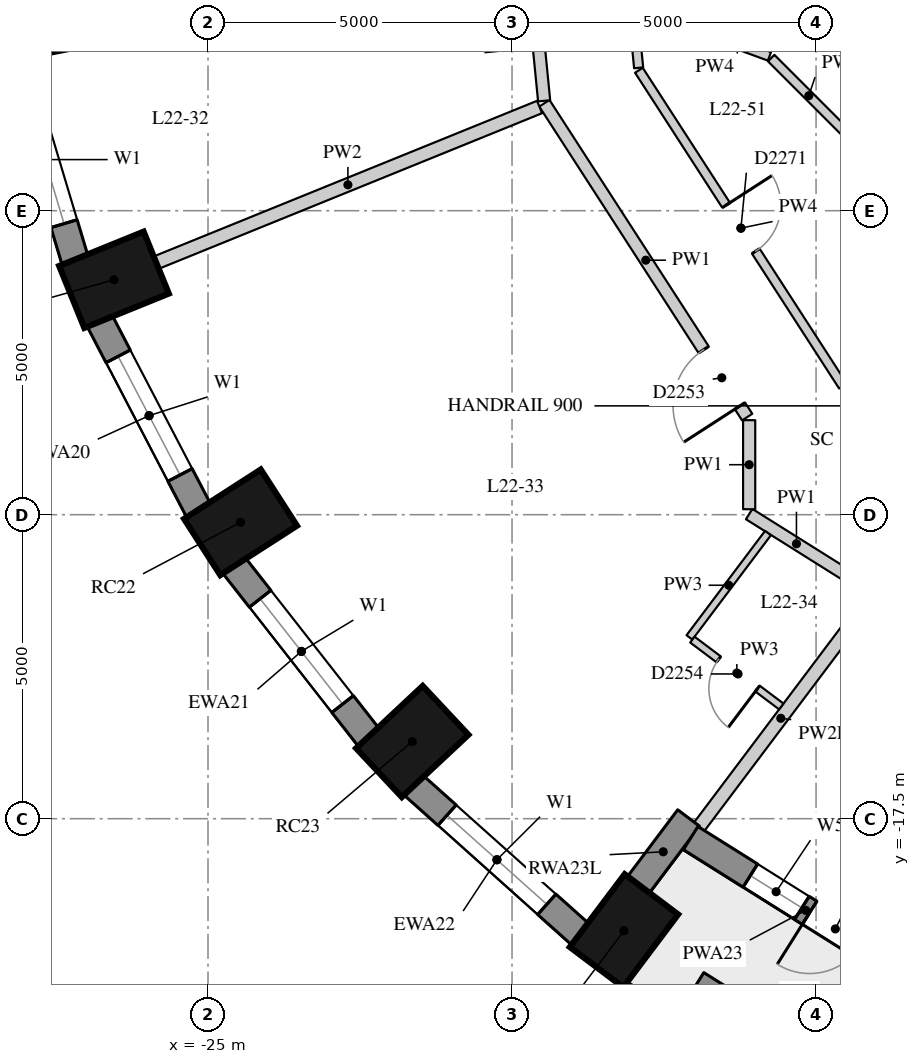
"""IFC4 building model, lengths in metres.
Left out: names, types, materials, properties, quantities, classifications, styles, units other than length and angle.
Written with IfcOpenShell. Run it as: python <this file> out.ifc"""

import sys

from ifc_helpers import new_model, si_unit, direction, frame, frame_2d, origin, origin_2d, place, context, subcontext, project, spatial, rectangle, extrude, element, fill, save


model = new_model("IFC4")
c1 = context("Model", 3, precision=1e-05, world=origin(), true_north=direction((0.0, 1.0)))
c2 = subcontext(c1, "Body", "Model", "MODEL_VIEW")
j1 = project(units=[si_unit("LENGTHUNIT", "METRE"), si_unit("PLANEANGLEUNIT", "RADIAN")], contexts=[c1])
p1 = place(None, origin())
s1 = spatial("IfcSite", under=j1, at=p1, CompositionType="ELEMENT")
p2 = place(p1, origin())
s2 = spatial("IfcBuilding", under=s1, at=p2, CompositionType="ELEMENT")
p3 = place(p2, frame((0.0, 0.0, 81.1)))
s3 = spatial("IfcBuildingStorey", under=s2, at=p3, CompositionType="ELEMENT", Elevation=81.1)
for number, where, z_axis, x_axis in (
    (1, (-27.821, -4.385, 0.0), (0.0, 0.0, 1.0), (-0.981, -0.193, 0.0)),
    (2, (-26.546, -8.636, 0.0), (0.0, 0.0, 1.0), (-0.927, -0.376, 0.0)),
    (3, (-24.465, -12.625, 0.0), (0.0, 0.0, 1.0), (-0.841, -0.541, 0.0)),
    (4, (-21.641, -16.23, 0.0), (0.0, 0.0, 1.0), (-0.73, -0.683, 0.0)),
    (5, (-18.159, -19.343, 0.0), (0.0, 0.0, 1.0), (-0.601, -0.799, 0.0)),
):
    element("IfcColumn", number, at=place(p3, frame(where, z_axis=z_axis, x_axis=x_axis)), inside=s3, PredefinedType="COLUMN", context=c2, shape_type="SweptSolid", body=[
        extrude(rectangle(XDim=1.5, YDim=1.1, at=origin_2d()), origin(), (0.0, 0.0, 1.0), 3.3),
    ])
p4 = place(p3, frame((-28.182, -4.996, 0.0), z_axis=(0.0, 0.0, 1.0), x_axis=(0.287064133733, -0.957911364963, 0.0)))
e6 = element("IfcWall", 6, at=p4, inside=s3, PredefinedType="SOLIDWALL", context=c2, shape_type="SweptSolid", body=[
    extrude(rectangle(XDim=3.473, YDim=0.45, at=frame_2d((1.737, 0.0))), origin(), (0.0, 0.0, 1.0), 2.85),
])
p5 = place(p4, frame((0.637, 0.0, 0.4)))
e7 = element("IfcOpeningElement", 7, at=p5, cuts=e6, PredefinedType="OPENING", context=c2, shape_type="SweptSolid", body=[
    extrude(rectangle(XDim=2.2, YDim=1.75, at=frame_2d((1.1, 0.875))), frame((0.0, 0.235, 0.0), z_axis=(0.0, -1.0, 0.0), x_axis=(1.0, 0.0, 0.0)), (0.0, 0.0, 1.0), 0.47),
])
p6 = place(p3, frame((-26.786, -9.305, 0.0), z_axis=(0.0, 0.0, 1.0), x_axis=(0.462492775226, -0.886623050041, 0.0)))
e8 = element("IfcWall", 8, at=p6, inside=s3, PredefinedType="SOLIDWALL", context=c2, shape_type="SweptSolid", body=[
    extrude(rectangle(XDim=3.532, YDim=0.45, at=frame_2d((1.766, 0.0))), origin(), (0.0, 0.0, 1.0), 2.85),
])
p7 = place(p6, frame((0.666, 0.0, 0.4)))
e9 = element("IfcOpeningElement", 9, at=p7, cuts=e8, PredefinedType="OPENING", context=c2, shape_type="SweptSolid", body=[
    extrude(rectangle(XDim=2.2, YDim=1.75, at=frame_2d((1.1, 0.875))), frame((0.0, 0.235, 0.0), z_axis=(0.0, -1.0, 0.0), x_axis=(1.0, 0.0, 0.0)), (0.0, 0.0, 1.0), 0.47),
])
p8 = place(p3, frame((-24.578, -13.328, 0.0), z_axis=(0.0, 0.0, 1.0), x_axis=(0.616661975264, -0.787228053529, 0.0)))
e10 = element("IfcWall", 10, at=p8, inside=s3, PredefinedType="SOLIDWALL", context=c2, shape_type="SweptSolid", body=[
    extrude(rectangle(XDim=3.61, YDim=0.45, at=frame_2d((1.805, 0.0))), origin(), (0.0, 0.0, 1.0), 2.85),
])
p9 = place(p8, frame((0.705, 0.0, 0.4)))
e11 = element("IfcOpeningElement", 11, at=p9, cuts=e10, PredefinedType="OPENING", context=c2, shape_type="SweptSolid", body=[
    extrude(rectangle(XDim=2.2, YDim=1.75, at=frame_2d((1.1, 0.875))), frame((0.0, 0.235, 0.0), z_axis=(0.0, -1.0, 0.0), x_axis=(1.0, 0.0, 0.0)), (0.0, 0.0, 1.0), 0.47),
])
p10 = place(p3, frame((-21.627, -16.943, 0.0), z_axis=(0.0, 0.0, 1.0), x_axis=(0.745526233716, -0.66647628228, 0.0)))
e12 = element("IfcWall", 12, at=p10, inside=s3, PredefinedType="SOLIDWALL", context=c2, shape_type="SweptSolid", body=[
    extrude(rectangle(XDim=3.697, YDim=0.45, at=frame_2d((1.848, 0.0))), origin(), (0.0, 0.0, 1.0), 2.85),
])
p11 = place(p10, frame((0.749, 0.0, 0.4)))
e13 = element("IfcOpeningElement", 13, at=p11, cuts=e12, PredefinedType="OPENING", context=c2, shape_type="SweptSolid", body=[
    extrude(rectangle(XDim=2.2, YDim=1.75, at=frame_2d((1.1, 0.875))), frame((0.0, 0.235, 0.0), z_axis=(0.0, -1.0, 0.0), x_axis=(1.0, 0.0, 0.0)), (0.0, 0.0, 1.0), 0.47),
])
p12 = place(p3, frame((-17.932, -18.6, 0.0), z_axis=(0.0, 0.0, 1.0), x_axis=(0.601262851241, 0.799051302306, 0.0)))
e14 = element("IfcWall", 14, at=p12, inside=s3, PredefinedType="SOLIDWALL", context=c2, shape_type="SweptSolid", body=[
    extrude(rectangle(XDim=1.391, YDim=0.45, at=frame_2d((0.696, 0.0))), origin(), (0.0, 0.0, 1.0), 2.4),
])
p13 = place(p3, frame((-17.062, -17.819, 0.0), z_axis=(0.0, 0.0, 1.0), x_axis=(0.846990101364, -0.531608660757, 0.0)))
e15 = element("IfcWall", 15, at=p13, inside=s3, PredefinedType="SOLIDWALL", context=c2, shape_type="SweptSolid", body=[
    extrude(rectangle(XDim=4.469, YDim=0.45, at=frame_2d((2.234, 0.0))), origin(), (0.0, 0.0, 1.0), 2.85),
])
p14 = place(p13, frame((1.159, 0.0, 0.4)))
e16 = element("IfcOpeningElement", 16, at=p14, cuts=e15, PredefinedType="OPENING", context=c2, shape_type="SweptSolid", body=[
    extrude(rectangle(XDim=1.0, YDim=1.75, at=frame_2d((0.5, 0.875))), frame((0.0, 0.235, 0.0), z_axis=(0.0, -1.0, 0.0), x_axis=(1.0, 0.0, 0.0)), (0.0, 0.0, 1.0), 0.47),
])
p15 = place(p13, frame((2.31, 0.0, 0.0)))
e17 = element("IfcOpeningElement", 17, at=p15, cuts=e15, PredefinedType="OPENING", context=c2, shape_type="SweptSolid", body=[
    extrude(rectangle(XDim=1.0, YDim=2.15, at=frame_2d((0.5, 1.075))), frame((0.0, 0.235, 0.0), z_axis=(0.0, -1.0, 0.0), x_axis=(1.0, 0.0, 0.0)), (0.0, 0.0, 1.0), 0.47),
])
p16 = place(p3, frame((-17.032, -20.328, 0.0), z_axis=(0.0, 0.0, 1.0), x_axis=(0.847609446823, -0.530620604252, 0.0)))
e18 = element("IfcWall", 18, at=p16, inside=s3, PredefinedType="USERDEFINED", context=c2, shape_type="SweptSolid", body=[
    extrude(rectangle(XDim=1.8, YDim=0.7, at=frame_2d((0.9, 0.0))), origin(), (0.0, 0.0, 1.0), 0.75),
])
p17 = place(p3, frame((-14.545, -13.466, 0.0), z_axis=(0.0, 0.0, 1.0), x_axis=(-0.846973518375, 0.531635080832, 0.0)))
e19 = element("IfcWall", 19, at=p17, inside=s3, PredefinedType="PARTITIONING", context=c2, shape_type="SweptSolid", body=[
    extrude(rectangle(XDim=1.836, YDim=0.2, at=frame_2d((0.918, 0.0))), origin(), (0.0, 0.0, 1.0), 2.85),
])
p18 = place(p3, frame((-16.1, -12.41, 0.0), z_axis=(0.0, 0.0, 1.0), x_axis=(0.0, 1.0, 0.0)))
e20 = element("IfcWall", 20, at=p18, inside=s3, PredefinedType="PARTITIONING", context=c2, shape_type="SweptSolid", body=[
    extrude(rectangle(XDim=1.465, YDim=0.2, at=frame_2d((0.732, 0.0))), origin(), (0.0, 0.0, 1.0), 2.85),
])
p19 = place(p3, frame((-16.132, -10.895, 0.0), z_axis=(0.0, 0.0, 1.0), x_axis=(-0.54275375647, 0.839891873897, 0.0)))
e21 = element("IfcWall", 21, at=p19, inside=s3, PredefinedType="PARTITIONING", context=c2, shape_type="SweptSolid", body=[
    extrude(rectangle(XDim=6.146, YDim=0.2, at=frame_2d((3.073, 0.0))), origin(), (0.0, 0.0, 1.0), 2.85),
])
p20 = place(p19, frame((0.22, 0.0, 0.0)))
e22 = element("IfcOpeningElement", 22, at=p20, cuts=e21, PredefinedType="OPENING", context=c2, shape_type="SweptSolid", body=[
    extrude(rectangle(XDim=1.1, YDim=2.1, at=frame_2d((0.55, 1.05))), frame((0.0, 0.11, 0.0), z_axis=(0.0, -1.0, 0.0), x_axis=(1.0, 0.0, 0.0)), (0.0, 0.0, 1.0), 0.22),
])
p21 = place(p3, frame((-19.472, -5.693, 0.0), z_axis=(0.0, 0.0, 1.0), x_axis=(-0.097987963337, 0.995187599923, 0.0)))
e23 = element("IfcWall", 23, at=p21, inside=s3, PredefinedType="PARTITIONING", context=c2, shape_type="SweptSolid", body=[
    extrude(rectangle(XDim=8.628, YDim=0.2, at=frame_2d((4.314, 0.0))), origin(), (0.0, 0.0, 1.0), 2.85),
])
p22 = place(p21, frame((5.28, 0.0, 0.0)))
e24 = element("IfcOpeningElement", 24, at=p22, cuts=e23, PredefinedType="OPENING", context=c2, shape_type="SweptSolid", body=[
    extrude(rectangle(XDim=1.1, YDim=2.1, at=frame_2d((0.55, 1.05))), frame((0.0, 0.11, 0.0), z_axis=(0.0, -1.0, 0.0), x_axis=(1.0, 0.0, 0.0)), (0.0, 0.0, 1.0), 0.22),
])
p23 = place(p21, frame((0.896, 0.0, 0.0)))
e25 = element("IfcOpeningElement", 25, at=p23, cuts=e23, PredefinedType="OPENING", context=c2, shape_type="SweptSolid", body=[
    extrude(rectangle(XDim=0.9, YDim=2.1, at=frame_2d((0.45, 1.05))), frame((0.0, 0.11, 0.0), z_axis=(0.0, -1.0, 0.0), x_axis=(1.0, 0.0, 0.0)), (0.0, 0.0, 1.0), 0.22),
])
p24 = place(p3, frame((-14.557, -10.384, 0.0), z_axis=(0.0, 0.0, 1.0), x_axis=(-0.542717528168, 0.839915284192, 0.0)))
e26 = element("IfcWall", 26, at=p24, inside=s3, PredefinedType="PARTITIONING", context=c2, shape_type="SweptSolid", body=[
    extrude(rectangle(XDim=6.184, YDim=0.15, at=frame_2d((3.092, 0.0))), origin(), (0.0, 0.0, 1.0), 2.85),
])
p25 = place(p24, frame((2.642, 0.0, 0.0)))
e27 = element("IfcOpeningElement", 27, at=p25, cuts=e26, PredefinedType="OPENING", context=c2, shape_type="SweptSolid", body=[
    extrude(rectangle(XDim=0.9, YDim=2.1, at=frame_2d((0.45, 1.05))), frame((0.0, 0.085, 0.0), z_axis=(0.0, -1.0, 0.0), x_axis=(1.0, 0.0, 0.0)), (0.0, 0.0, 1.0), 0.17),
])
p26 = place(p3, frame((-17.917, -5.15, 0.0), z_axis=(0.0, 0.0, 1.0), x_axis=(-0.098011382053, 0.995185293796, 0.0)))
e28 = element("IfcWall", 28, at=p26, inside=s3, PredefinedType="PARTITIONING", context=c2, shape_type="SweptSolid", body=[
    extrude(rectangle(XDim=2.608, YDim=0.15, at=frame_2d((1.304, 0.0))), origin(), (0.0, 0.0, 1.0), 2.85),
])
p27 = place(p3, frame((-16.824, -4.572, 0.0), z_axis=(0.0, 0.0, 1.0), x_axis=(0.938465057683, -0.345374196355, 0.0)))
e29 = element("IfcWall", 29, at=p27, inside=s3, PredefinedType="PARTITIONING", context=c2, shape_type="SweptSolid", body=[
    extrude(rectangle(XDim=1.127, YDim=0.15, at=frame_2d((0.564, 0.0))), origin(), (0.0, 0.0, 1.0), 2.85),
])
p28 = place(p3, frame((-15.738, -4.99, 0.0), z_axis=(0.0, 0.0, 1.0), x_axis=(0.707037063979, -0.707176491521, 0.0)))
e30 = element("IfcWall", 30, at=p28, inside=s3, PredefinedType="PARTITIONING", context=c2, shape_type="SweptSolid", body=[
    extrude(rectangle(XDim=1.751, YDim=0.15, at=frame_2d((0.875, 0.0))), origin(), (0.0, 0.0, 1.0), 2.85),
])
p29 = place(p3, frame((-25.851, -8.354, 0.0), z_axis=(0.0, 0.0, 1.0), x_axis=(0.926556482368, 0.376155665892, 0.0)))
e31 = element("IfcWall", 31, at=p29, inside=s3, PredefinedType="PARTITIONING", context=c2, shape_type="SweptSolid", body=[
    extrude(rectangle(XDim=6.804, YDim=0.22, at=frame_2d((3.402, 0.0))), origin(), (0.0, 0.0, 1.0), 2.85),
])
p30 = place(p3, frame((-16.927, -17.638, 0.0), z_axis=(0.0, 0.0, 1.0), x_axis=(0.601158965663, 0.799129462605, 0.0)))
e32 = element("IfcWall", 32, at=p30, inside=s3, PredefinedType="PARTITIONING", context=c2, shape_type="SweptSolid", body=[
    extrude(rectangle(XDim=4.48, YDim=0.22, at=frame_2d((2.24, 0.0))), origin(), (0.0, 0.0, 1.0), 2.4),
])
p31 = place(p3, frame((-15.791, -12.802, 0.0), z_axis=(0.0, 0.0, 1.0), x_axis=(-0.601308910174, -0.79901664222, 0.0)))
e33 = element("IfcWall", 33, at=p31, inside=s3, PredefinedType="PARTITIONING", context=c2, shape_type="SweptSolid", body=[
    extrude(rectangle(XDim=2.147, YDim=0.12, at=frame_2d((1.074, 0.0))), origin(), (0.0, 0.0, 1.0), 2.85),
])
p32 = place(p3, frame((-17.034, -14.554, 0.0), z_axis=(0.0, 0.0, 1.0), x_axis=(0.799182868338, -0.601087966071, 0.0)))
e34 = element("IfcWall", 34, at=p32, inside=s3, PredefinedType="PARTITIONING", context=c2, shape_type="SweptSolid", body=[
    extrude(rectangle(XDim=1.83, YDim=0.12, at=frame_2d((0.915, 0.0))), origin(), (0.0, 0.0, 1.0), 2.85),
])
p33 = place(p32, frame((0.54, 0.0, 0.0)))
e35 = element("IfcOpeningElement", 35, at=p33, cuts=e34, PredefinedType="OPENING", context=c2, shape_type="SweptSolid", body=[
    extrude(rectangle(XDim=0.8, YDim=2.1, at=frame_2d((0.4, 1.05))), frame((0.0, 0.07, 0.0), z_axis=(0.0, -1.0, 0.0), x_axis=(1.0, 0.0, 0.0)), (0.0, 0.0, 1.0), 0.14),
])
p34 = place(p5, origin())
e36 = element("IfcWindow", 36, at=p34, inside=s3, PartitioningType="SINGLE_PANEL", PredefinedType="WINDOW", context=c2, shape_type="SweptSolid", body=[
    extrude(rectangle(XDim=2.2, YDim=1.75, at=frame_2d((1.1, 0.875))), frame((0.0, 0.035, 0.0), z_axis=(0.0, -1.0, 0.0), x_axis=(1.0, 0.0, 0.0)), (0.0, 0.0, 1.0), 0.06),
])
fill(e7, e36)
p35 = place(p7, origin())
e37 = element("IfcWindow", 37, at=p35, inside=s3, PartitioningType="SINGLE_PANEL", PredefinedType="WINDOW", context=c2, shape_type="SweptSolid", body=[
    extrude(rectangle(XDim=2.2, YDim=1.75, at=frame_2d((1.1, 0.875))), frame((0.0, 0.035, 0.0), z_axis=(0.0, -1.0, 0.0), x_axis=(1.0, 0.0, 0.0)), (0.0, 0.0, 1.0), 0.06),
])
fill(e9, e37)
p36 = place(p9, origin())
e38 = element("IfcWindow", 38, at=p36, inside=s3, PartitioningType="SINGLE_PANEL", PredefinedType="WINDOW", context=c2, shape_type="SweptSolid", body=[
    extrude(rectangle(XDim=2.2, YDim=1.75, at=frame_2d((1.1, 0.875))), frame((0.0, 0.035, 0.0), z_axis=(0.0, -1.0, 0.0), x_axis=(1.0, 0.0, 0.0)), (0.0, 0.0, 1.0), 0.06),
])
fill(e11, e38)
p37 = place(p11, origin())
e39 = element("IfcWindow", 39, at=p37, inside=s3, PartitioningType="SINGLE_PANEL", PredefinedType="WINDOW", context=c2, shape_type="SweptSolid", body=[
    extrude(rectangle(XDim=2.2, YDim=1.75, at=frame_2d((1.1, 0.875))), frame((0.0, 0.035, 0.0), z_axis=(0.0, -1.0, 0.0), x_axis=(1.0, 0.0, 0.0)), (0.0, 0.0, 1.0), 0.06),
])
fill(e13, e39)
p38 = place(p14, origin())
e40 = element("IfcWindow", 40, at=p38, inside=s3, PartitioningType="SINGLE_PANEL", PredefinedType="WINDOW", context=c2, shape_type="SweptSolid", body=[
    extrude(rectangle(XDim=1.0, YDim=1.75, at=frame_2d((0.5, 0.875))), frame((0.0, 0.035, 0.0), z_axis=(0.0, -1.0, 0.0), x_axis=(1.0, 0.0, 0.0)), (0.0, 0.0, 1.0), 0.06),
])
fill(e16, e40)
p39 = place(p15, frame((1.0, 0.0, 0.0), z_axis=(0.0, 0.0, 1.0), x_axis=(-1.0, 0.0, 0.0)))
e41 = element("IfcDoor", 41, at=p39, inside=s3, OperationType="SINGLE_SWING_RIGHT", PredefinedType="DOOR", context=c2, shape_type="SweptSolid", body=[
    extrude(rectangle(XDim=1.0, YDim=2.15, at=frame_2d((0.5, 1.075))), frame((0.0, 0.075, 0.0), z_axis=(0.0, -1.0, 0.0), x_axis=(1.0, 0.0, 0.0)), (0.0, 0.0, 1.0), 0.05),
])
fill(e17, e41)
p40 = place(p20, origin())
e42 = element("IfcDoor", 42, at=p40, inside=s3, OperationType="SINGLE_SWING_LEFT", PredefinedType="DOOR", context=c2, shape_type="SweptSolid", body=[
    extrude(rectangle(XDim=1.1, YDim=2.1, at=frame_2d((0.55, 1.05))), frame((0.0, 0.025, 0.0), z_axis=(0.0, -1.0, 0.0), x_axis=(1.0, 0.0, 0.0)), (0.0, 0.0, 1.0), 0.05),
])
fill(e22, e42)
p41 = place(p33, origin())
e43 = element("IfcDoor", 43, at=p41, inside=s3, OperationType="SINGLE_SWING_LEFT", PredefinedType="DOOR", context=c2, shape_type="SweptSolid", body=[
    extrude(rectangle(XDim=0.8, YDim=2.1, at=frame_2d((0.4, 1.05))), frame((0.0, 0.025, 0.0), z_axis=(0.0, -1.0, 0.0), x_axis=(1.0, 0.0, 0.0)), (0.0, 0.0, 1.0), 0.05),
])
fill(e35, e43)
p42 = place(p25, origin())
e44 = element("IfcDoor", 44, at=p42, inside=s3, OperationType="SINGLE_SWING_LEFT", PredefinedType="DOOR", context=c2, shape_type="SweptSolid", body=[
    extrude(rectangle(XDim=0.9, YDim=2.1, at=frame_2d((0.45, 1.05))), frame((0.0, 0.025, 0.0), z_axis=(0.0, -1.0, 0.0), x_axis=(1.0, 0.0, 0.0)), (0.0, 0.0, 1.0), 0.05),
])
fill(e27, e44)
save(model, sys.argv[1])
